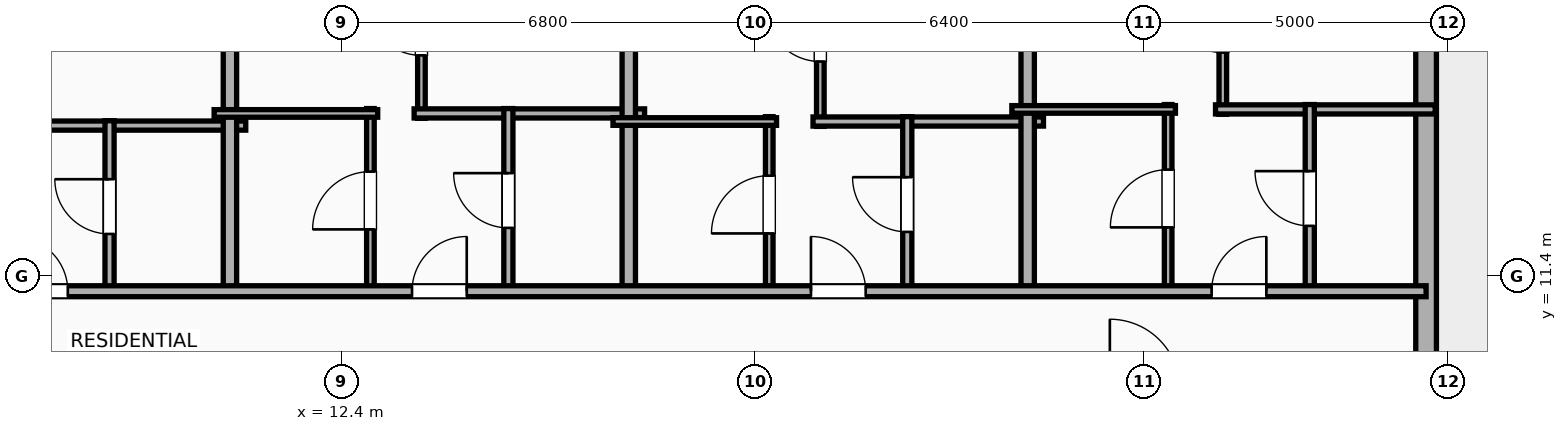
"""IFC4 building model, lengths in metres.
Left out: names, types, materials, properties, quantities, classifications, styles, units other than length and angle.
Written with IfcOpenShell. Run it as: python <this file> out.ifc"""

import sys

from ifc_helpers import new_model, si_unit, direction, frame, frame_2d, origin, place, context, subcontext, project, spatial, rectangle, extrude, element, fill, save


model = new_model("IFC4")
c1 = context("Model", 3, precision=1e-05, world=origin(), true_north=direction((0.0, 1.0)))
c2 = subcontext(c1, "Body", "Model", "MODEL_VIEW")
j1 = project(units=[si_unit("LENGTHUNIT", "METRE"), si_unit("PLANEANGLEUNIT", "RADIAN")], contexts=[c1])
p1 = place(None, origin())
s1 = spatial("IfcSite", under=j1, at=p1, CompositionType="ELEMENT")
p2 = place(p1, origin())
s2 = spatial("IfcBuilding", under=s1, at=p2, CompositionType="ELEMENT")
p3 = place(p2, frame((0.0, 0.0, 231.4)))
s3 = spatial("IfcBuildingStorey", under=s2, at=p3, CompositionType="ELEMENT", Elevation=231.4)
p4 = place(p3, frame((30.23, 16.583, 0.0), z_axis=(0.0, 0.0, 1.0), x_axis=(0.0, -1.0, 0.0)))
e1 = element("IfcWall", 1, at=p4, inside=s3, PredefinedType="ELEMENTEDWALL", context=c2, shape_type="SweptSolid", body=[
    extrude(rectangle(XDim=31.967, YDim=0.34, at=frame_2d((15.983, 0.0))), origin(), (0.0, 0.0, 1.0), 3.65),
])
p5 = place(p4, frame((23.925, 0.0, 0.75)))
e2 = element("IfcOpeningElement", 2, at=p5, cuts=e1, PredefinedType="OPENING", context=c2, shape_type="SweptSolid", body=[
    extrude(rectangle(XDim=1.8, YDim=2.1, at=frame_2d((0.9, 1.05))), frame((0.0, 0.18, 0.0), z_axis=(0.0, -1.0, 0.0), x_axis=(1.0, 0.0, 0.0)), (0.0, 0.0, 1.0), 0.36),
])
p6 = place(p4, frame((30.402, 0.0, 0.75)))
e3 = element("IfcOpeningElement", 3, at=p6, cuts=e1, PredefinedType="OPENING", context=c2, shape_type="SweptSolid", body=[
    extrude(rectangle(XDim=1.2, YDim=2.05, at=frame_2d((0.6, 1.025))), frame((0.0, 0.18, 0.0), z_axis=(0.0, -1.0, 0.0), x_axis=(1.0, 0.0, 0.0)), (0.0, 0.0, 1.0), 0.36),
])
p7 = place(p4, frame((11.113, 0.0, 0.75)))
e4 = element("IfcOpeningElement", 4, at=p7, cuts=e1, PredefinedType="OPENING", context=c2, shape_type="SweptSolid", body=[
    extrude(rectangle(XDim=1.2, YDim=2.05, at=frame_2d((0.6, 1.025))), frame((0.0, 0.18, 0.0), z_axis=(0.0, -1.0, 0.0), x_axis=(1.0, 0.0, 0.0)), (0.0, 0.0, 1.0), 0.36),
])
p8 = place(p3, frame((7.029, 13.874, 0.0), z_axis=(0.0, 0.0, 1.0), x_axis=(1.0, 0.0, 0.0)))
e5 = element("IfcWall", 5, at=p8, inside=s3, PredefinedType="PLUMBINGWALL", context=c2, shape_type="SweptSolid", body=[
    extrude(rectangle(XDim=3.79, YDim=0.15, at=frame_2d((1.895, 0.0))), origin(), (0.0, 0.0, 1.0), 3.65),
])
p9 = place(p3, frame((8.579, 11.13, 0.0), z_axis=(0.0, 0.0, 1.0), x_axis=(0.0, 1.0, 0.0)))
e6 = element("IfcWall", 6, at=p9, inside=s3, PredefinedType="PLUMBINGWALL", context=c2, shape_type="SweptSolid", body=[
    extrude(rectangle(XDim=2.824, YDim=0.15, at=frame_2d((1.412, 0.0))), origin(), (0.0, 0.0, 1.0), 3.65),
])
p10 = place(p9, frame((0.962, 0.0, 0.0)))
e7 = element("IfcOpeningElement", 7, at=p10, cuts=e6, PredefinedType="OPENING", context=c2, shape_type="SweptSolid", body=[
    extrude(rectangle(XDim=0.9, YDim=2.05, at=frame_2d((0.45, 1.025))), frame((0.0, 0.085, 0.0), z_axis=(0.0, -1.0, 0.0), x_axis=(1.0, 0.0, 0.0)), (0.0, 0.0, 1.0), 0.17),
])
p11 = place(p3, frame((10.559, 11.07, 0.0), z_axis=(0.0, 0.0, 1.0), x_axis=(0.0, 1.0, 0.0)))
e8 = element("IfcWall", 8, at=p11, inside=s3, PredefinedType="PARTITIONING", context=c2, shape_type="SweptSolid", body=[
    extrude(rectangle(XDim=8.96, YDim=0.22, at=frame_2d((4.48, 0.0))), origin(), (0.0, 0.0, 1.0), 3.65),
])
p12 = place(p3, frame((13.708, 13.994, 0.0), z_axis=(0.0, 0.0, 1.0), x_axis=(0.0, 1.0, 0.0)))
e9 = element("IfcWall", 9, at=p12, inside=s3, PredefinedType="PARTITIONING", context=c2, shape_type="SweptSolid", body=[
    extrude(rectangle(XDim=6.186, YDim=0.125, at=frame_2d((3.093, 0.0))), origin(), (0.0, 0.0, 1.0), 3.65),
])
p13 = place(p12, frame((1.035, 0.0, 0.0)))
e10 = element("IfcOpeningElement", 10, at=p13, cuts=e9, PredefinedType="OPENING", context=c2, shape_type="SweptSolid", body=[
    extrude(rectangle(XDim=0.9, YDim=2.05, at=frame_2d((0.45, 1.025))), frame((0.0, 0.073, 0.0), z_axis=(0.0, -1.0, 0.0), x_axis=(1.0, 0.0, 0.0)), (0.0, 0.0, 1.0), 0.145),
])
p14 = place(p3, frame((13.588, 14.074, 0.0), z_axis=(0.0, 0.0, 1.0), x_axis=(1.0, 0.0, 0.0)))
e11 = element("IfcWall", 11, at=p14, inside=s3, PredefinedType="PLUMBINGWALL", context=c2, shape_type="SweptSolid", body=[
    extrude(rectangle(XDim=3.79, YDim=0.15, at=frame_2d((1.895, 0.0))), origin(), (0.0, 0.0, 1.0), 3.65),
])
p15 = place(p3, frame((12.869, 11.13, 0.0), z_axis=(0.0, 0.0, 1.0), x_axis=(0.0, 1.0, 0.0)))
e12 = element("IfcWall", 12, at=p15, inside=s3, PredefinedType="PARTITIONING", context=c2, shape_type="SweptSolid", body=[
    extrude(rectangle(XDim=3.024, YDim=0.125, at=frame_2d((1.512, 0.0))), origin(), (0.0, 0.0, 1.0), 3.65),
])
p16 = place(p15, frame((1.037, 0.0, 0.0)))
e13 = element("IfcOpeningElement", 13, at=p16, cuts=e12, PredefinedType="OPENING", context=c2, shape_type="SweptSolid", body=[
    extrude(rectangle(XDim=0.95, YDim=2.05, at=frame_2d((0.475, 1.025))), frame((0.0, 0.073, 0.0), z_axis=(0.0, -1.0, 0.0), x_axis=(1.0, 0.0, 0.0)), (0.0, 0.0, 1.0), 0.145),
])
p17 = place(p3, frame((10.299, 14.074, 0.0), z_axis=(0.0, 0.0, 1.0), x_axis=(1.0, 0.0, 0.0)))
e14 = element("IfcWall", 14, at=p17, inside=s3, PredefinedType="PARTITIONING", context=c2, shape_type="SweptSolid", body=[
    extrude(rectangle(XDim=2.69, YDim=0.125, at=frame_2d((1.345, 0.0))), origin(), (0.0, 0.0, 1.0), 3.65),
])
p18 = place(p3, frame((15.138, 11.13, 0.0), z_axis=(0.0, 0.0, 1.0), x_axis=(0.0, 1.0, 0.0)))
e15 = element("IfcWall", 15, at=p18, inside=s3, PredefinedType="PLUMBINGWALL", context=c2, shape_type="SweptSolid", body=[
    extrude(rectangle(XDim=3.024, YDim=0.15, at=frame_2d((1.512, 0.0))), origin(), (0.0, 0.0, 1.0), 3.65),
])
p19 = place(p18, frame((1.062, 0.0, 0.0)))
e16 = element("IfcOpeningElement", 16, at=p19, cuts=e15, PredefinedType="OPENING", context=c2, shape_type="SweptSolid", body=[
    extrude(rectangle(XDim=0.9, YDim=2.05, at=frame_2d((0.45, 1.025))), frame((0.0, 0.085, 0.0), z_axis=(0.0, -1.0, 0.0), x_axis=(1.0, 0.0, 0.0)), (0.0, 0.0, 1.0), 0.17),
])
p20 = place(p3, frame((17.118, 11.07, 0.0), z_axis=(0.0, 0.0, 1.0), x_axis=(0.0, 1.0, 0.0)))
e17 = element("IfcWall", 17, at=p20, inside=s3, PredefinedType="PARTITIONING", context=c2, shape_type="SweptSolid", body=[
    extrude(rectangle(XDim=8.96, YDim=0.22, at=frame_2d((4.48, 0.0))), origin(), (0.0, 0.0, 1.0), 3.65),
])
p21 = place(p3, frame((20.268, 13.861, 0.0), z_axis=(0.0, 0.0, 1.0), x_axis=(0.0, 1.0, 0.0)))
e18 = element("IfcWall", 18, at=p21, inside=s3, PredefinedType="PARTITIONING", context=c2, shape_type="SweptSolid", body=[
    extrude(rectangle(XDim=6.319, YDim=0.125, at=frame_2d((3.159, 0.0))), origin(), (0.0, 0.0, 1.0), 3.65),
])
p22 = place(p21, frame((1.067, 0.0, 0.0)))
e19 = element("IfcOpeningElement", 19, at=p22, cuts=e18, PredefinedType="OPENING", context=c2, shape_type="SweptSolid", body=[
    extrude(rectangle(XDim=0.9, YDim=2.05, at=frame_2d((0.45, 1.025))), frame((0.0, 0.073, 0.0), z_axis=(0.0, -1.0, 0.0), x_axis=(1.0, 0.0, 0.0)), (0.0, 0.0, 1.0), 0.145),
])
p23 = place(p3, frame((20.148, 13.941, 0.0), z_axis=(0.0, 0.0, 1.0), x_axis=(1.0, 0.0, 0.0)))
e20 = element("IfcWall", 20, at=p23, inside=s3, PredefinedType="PLUMBINGWALL", context=c2, shape_type="SweptSolid", body=[
    extrude(rectangle(XDim=3.79, YDim=0.15, at=frame_2d((1.895, 0.0))), origin(), (0.0, 0.0, 1.0), 3.65),
])
p24 = place(p3, frame((19.428, 11.13, 0.0), z_axis=(0.0, 0.0, 1.0), x_axis=(0.0, 1.0, 0.0)))
e21 = element("IfcWall", 21, at=p24, inside=s3, PredefinedType="PARTITIONING", context=c2, shape_type="SweptSolid", body=[
    extrude(rectangle(XDim=2.891, YDim=0.125, at=frame_2d((1.446, 0.0))), origin(), (0.0, 0.0, 1.0), 3.65),
])
p25 = place(p24, frame((0.97, 0.0, 0.0)))
e22 = element("IfcOpeningElement", 22, at=p25, cuts=e21, PredefinedType="OPENING", context=c2, shape_type="SweptSolid", body=[
    extrude(rectangle(XDim=0.95, YDim=2.05, at=frame_2d((0.475, 1.025))), frame((0.0, 0.073, 0.0), z_axis=(0.0, -1.0, 0.0), x_axis=(1.0, 0.0, 0.0)), (0.0, 0.0, 1.0), 0.145),
])
p26 = place(p3, frame((16.858, 13.941, 0.0), z_axis=(0.0, 0.0, 1.0), x_axis=(1.0, 0.0, 0.0)))
e23 = element("IfcWall", 23, at=p26, inside=s3, PredefinedType="PARTITIONING", context=c2, shape_type="SweptSolid", body=[
    extrude(rectangle(XDim=2.69, YDim=0.125, at=frame_2d((1.345, 0.0))), origin(), (0.0, 0.0, 1.0), 3.65),
])
p27 = place(p3, frame((21.698, 11.13, 0.0), z_axis=(0.0, 0.0, 1.0), x_axis=(0.0, 1.0, 0.0)))
e24 = element("IfcWall", 24, at=p27, inside=s3, PredefinedType="PLUMBINGWALL", context=c2, shape_type="SweptSolid", body=[
    extrude(rectangle(XDim=2.891, YDim=0.15, at=frame_2d((1.446, 0.0))), origin(), (0.0, 0.0, 1.0), 3.65),
])
p28 = place(p27, frame((0.996, 0.0, 0.0)))
e25 = element("IfcOpeningElement", 25, at=p28, cuts=e24, PredefinedType="OPENING", context=c2, shape_type="SweptSolid", body=[
    extrude(rectangle(XDim=0.9, YDim=2.05, at=frame_2d((0.45, 1.025))), frame((0.0, 0.085, 0.0), z_axis=(0.0, -1.0, 0.0), x_axis=(1.0, 0.0, 0.0)), (0.0, 0.0, 1.0), 0.17),
])
p29 = place(p3, frame((23.678, 11.07, 0.0), z_axis=(0.0, 0.0, 1.0), x_axis=(0.0, 1.0, 0.0)))
e26 = element("IfcWall", 26, at=p29, inside=s3, PredefinedType="PARTITIONING", context=c2, shape_type="SweptSolid", body=[
    extrude(rectangle(XDim=8.96, YDim=0.22, at=frame_2d((4.48, 0.0))), origin(), (0.0, 0.0, 1.0), 3.65),
])
p30 = place(p3, frame((26.887, 14.06, 0.0), z_axis=(0.0, 0.0, 1.0), x_axis=(0.0, 1.0, 0.0)))
e27 = element("IfcWall", 27, at=p30, inside=s3, PredefinedType="PARTITIONING", context=c2, shape_type="SweptSolid", body=[
    extrude(rectangle(XDim=6.102, YDim=0.125, at=frame_2d((3.051, 0.0))), origin(), (0.0, 0.0, 1.0), 3.65),
])
p31 = place(p30, frame((1.015, 0.0, 0.0)))
e28 = element("IfcOpeningElement", 28, at=p31, cuts=e27, PredefinedType="OPENING", context=c2, shape_type="SweptSolid", body=[
    extrude(rectangle(XDim=0.9, YDim=2.05, at=frame_2d((0.45, 1.025))), frame((0.0, 0.073, 0.0), z_axis=(0.0, -1.0, 0.0), x_axis=(1.0, 0.0, 0.0)), (0.0, 0.0, 1.0), 0.145),
])
p32 = place(p3, frame((26.767, 14.14, 0.0), z_axis=(0.0, 0.0, 1.0), x_axis=(1.0, 0.0, 0.0)))
e29 = element("IfcWall", 29, at=p32, inside=s3, PredefinedType="PLUMBINGWALL", context=c2, shape_type="SweptSolid", body=[
    extrude(rectangle(XDim=3.613, YDim=0.15, at=frame_2d((1.806, 0.0))), origin(), (0.0, 0.0, 1.0), 3.65),
])
p33 = place(p3, frame((25.988, 11.13, 0.0), z_axis=(0.0, 0.0, 1.0), x_axis=(0.0, 1.0, 0.0)))
e30 = element("IfcWall", 30, at=p33, inside=s3, PredefinedType="PARTITIONING", context=c2, shape_type="SweptSolid", body=[
    extrude(rectangle(XDim=3.09, YDim=0.125, at=frame_2d((1.545, 0.0))), origin(), (0.0, 0.0, 1.0), 3.65),
])
p34 = place(p33, frame((1.07, 0.0, 0.0)))
e31 = element("IfcOpeningElement", 31, at=p34, cuts=e30, PredefinedType="OPENING", context=c2, shape_type="SweptSolid", body=[
    extrude(rectangle(XDim=0.95, YDim=2.05, at=frame_2d((0.475, 1.025))), frame((0.0, 0.073, 0.0), z_axis=(0.0, -1.0, 0.0), x_axis=(1.0, 0.0, 0.0)), (0.0, 0.0, 1.0), 0.145),
])
p35 = place(p3, frame((23.418, 14.14, 0.0), z_axis=(0.0, 0.0, 1.0), x_axis=(1.0, 0.0, 0.0)))
e32 = element("IfcWall", 32, at=p35, inside=s3, PredefinedType="PARTITIONING", context=c2, shape_type="SweptSolid", body=[
    extrude(rectangle(XDim=2.69, YDim=0.125, at=frame_2d((1.345, 0.0))), origin(), (0.0, 0.0, 1.0), 3.65),
])
p36 = place(p3, frame((28.317, 11.13, 0.0), z_axis=(0.0, 0.0, 1.0), x_axis=(0.0, 1.0, 0.0)))
e33 = element("IfcWall", 33, at=p36, inside=s3, PredefinedType="PLUMBINGWALL", context=c2, shape_type="SweptSolid", body=[
    extrude(rectangle(XDim=3.09, YDim=0.15, at=frame_2d((1.545, 0.0))), origin(), (0.0, 0.0, 1.0), 3.65),
])
p37 = place(p36, frame((1.095, 0.0, 0.0)))
e34 = element("IfcOpeningElement", 34, at=p37, cuts=e33, PredefinedType="OPENING", context=c2, shape_type="SweptSolid", body=[
    extrude(rectangle(XDim=0.9, YDim=2.05, at=frame_2d((0.45, 1.025))), frame((0.0, 0.085, 0.0), z_axis=(0.0, -1.0, 0.0), x_axis=(1.0, 0.0, 0.0)), (0.0, 0.0, 1.0), 0.17),
])
p38 = place(p3, frame((-26.23, 11.15, 0.0), z_axis=(0.0, 0.0, 1.0), x_axis=(1.0, 0.0, 0.0)))
e35 = element("IfcWall", 35, at=p38, inside=s3, PredefinedType="PARTITIONING", context=c2, shape_type="SweptSolid", body=[
    extrude(rectangle(XDim=56.46, YDim=0.18, at=frame_2d((28.23, 0.0))), origin(), (0.0, 0.0, 1.0), 3.65),
])
p39 = place(p38, frame((3.614, 0.0, 0.0)))
e36 = element("IfcOpeningElement", 36, at=p39, cuts=e35, PredefinedType="OPENING", context=c2, shape_type="SweptSolid", body=[
    extrude(rectangle(XDim=1.15, YDim=2.05, at=frame_2d((0.575, 1.025))), frame((0.0, 0.1, 0.0), z_axis=(0.0, -1.0, 0.0), x_axis=(1.0, 0.0, 0.0)), (0.0, 0.0, 1.0), 0.2),
])
p40 = place(p38, frame((11.761, 0.0, 0.0)))
e37 = element("IfcOpeningElement", 37, at=p40, cuts=e35, PredefinedType="OPENING", context=c2, shape_type="SweptSolid", body=[
    extrude(rectangle(XDim=1.15, YDim=2.05, at=frame_2d((0.575, 1.025))), frame((0.0, 0.1, 0.0), z_axis=(0.0, -1.0, 0.0), x_axis=(1.0, 0.0, 0.0)), (0.0, 0.0, 1.0), 0.2),
])
p41 = place(p38, frame((19.447, 0.0, 0.0)))
e38 = element("IfcOpeningElement", 38, at=p41, cuts=e35, PredefinedType="OPENING", context=c2, shape_type="SweptSolid", body=[
    extrude(rectangle(XDim=0.9, YDim=2.05, at=frame_2d((0.45, 1.025))), frame((0.0, 0.1, 0.0), z_axis=(0.0, -1.0, 0.0), x_axis=(1.0, 0.0, 0.0)), (0.0, 0.0, 1.0), 0.2),
])
p42 = place(p38, frame((26.448, 0.0, 0.0)))
e39 = element("IfcOpeningElement", 39, at=p42, cuts=e35, PredefinedType="OPENING", context=c2, shape_type="SweptSolid", body=[
    extrude(rectangle(XDim=0.9, YDim=2.05, at=frame_2d((0.45, 1.025))), frame((0.0, 0.1, 0.0), z_axis=(0.0, -1.0, 0.0), x_axis=(1.0, 0.0, 0.0)), (0.0, 0.0, 1.0), 0.2),
])
p43 = place(p38, frame((33.223, 0.0, 0.0)))
e40 = element("IfcOpeningElement", 40, at=p43, cuts=e35, PredefinedType="OPENING", context=c2, shape_type="SweptSolid", body=[
    extrude(rectangle(XDim=0.9, YDim=2.05, at=frame_2d((0.45, 1.025))), frame((0.0, 0.1, 0.0), z_axis=(0.0, -1.0, 0.0), x_axis=(1.0, 0.0, 0.0)), (0.0, 0.0, 1.0), 0.2),
])
p44 = place(p38, frame((39.783, 0.0, 0.0)))
e41 = element("IfcOpeningElement", 41, at=p44, cuts=e35, PredefinedType="OPENING", context=c2, shape_type="SweptSolid", body=[
    extrude(rectangle(XDim=0.9, YDim=2.05, at=frame_2d((0.45, 1.025))), frame((0.0, 0.1, 0.0), z_axis=(0.0, -1.0, 0.0), x_axis=(1.0, 0.0, 0.0)), (0.0, 0.0, 1.0), 0.2),
])
p45 = place(p38, frame((46.344, 0.0, 0.0)))
e42 = element("IfcOpeningElement", 42, at=p45, cuts=e35, PredefinedType="OPENING", context=c2, shape_type="SweptSolid", body=[
    extrude(rectangle(XDim=0.9, YDim=2.05, at=frame_2d((0.45, 1.025))), frame((0.0, 0.1, 0.0), z_axis=(0.0, -1.0, 0.0), x_axis=(1.0, 0.0, 0.0)), (0.0, 0.0, 1.0), 0.2),
])
p46 = place(p38, frame((52.933, 0.0, 0.0)))
e43 = element("IfcOpeningElement", 43, at=p46, cuts=e35, PredefinedType="OPENING", context=c2, shape_type="SweptSolid", body=[
    extrude(rectangle(XDim=0.9, YDim=2.05, at=frame_2d((0.45, 1.025))), frame((0.0, 0.1, 0.0), z_axis=(0.0, -1.0, 0.0), x_axis=(1.0, 0.0, 0.0)), (0.0, 0.0, 1.0), 0.2),
])
p47 = place(p10, origin())
e44 = element("IfcDoor", 44, at=p47, inside=s3, OperationType="SINGLE_SWING_RIGHT", PredefinedType="DOOR", context=c2, shape_type="SweptSolid", body=[
    extrude(rectangle(XDim=0.9, YDim=2.05, at=frame_2d((0.45, 1.025))), frame((0.0, 0.025, 0.0), z_axis=(0.0, -1.0, 0.0), x_axis=(1.0, 0.0, 0.0)), (0.0, 0.0, 1.0), 0.05),
])
fill(e7, e44)
p48 = place(p13, origin())
e45 = element("IfcDoor", 45, at=p48, inside=s3, OperationType="SINGLE_SWING_RIGHT", PredefinedType="DOOR", context=c2, shape_type="SweptSolid", body=[
    extrude(rectangle(XDim=0.9, YDim=2.05, at=frame_2d((0.45, 1.025))), frame((0.0, 0.025, 0.0), z_axis=(0.0, -1.0, 0.0), x_axis=(1.0, 0.0, 0.0)), (0.0, 0.0, 1.0), 0.05),
])
fill(e10, e45)
p49 = place(p16, origin())
e46 = element("IfcDoor", 46, at=p49, inside=s3, OperationType="SINGLE_SWING_LEFT", PredefinedType="DOOR", context=c2, shape_type="SweptSolid", body=[
    extrude(rectangle(XDim=0.95, YDim=2.05, at=frame_2d((0.475, 1.025))), frame((0.0, 0.025, 0.0), z_axis=(0.0, -1.0, 0.0), x_axis=(1.0, 0.0, 0.0)), (0.0, 0.0, 1.0), 0.05),
])
fill(e13, e46)
p50 = place(p19, origin())
e47 = element("IfcDoor", 47, at=p50, inside=s3, OperationType="SINGLE_SWING_RIGHT", PredefinedType="DOOR", context=c2, shape_type="SweptSolid", body=[
    extrude(rectangle(XDim=0.9, YDim=2.05, at=frame_2d((0.45, 1.025))), frame((0.0, 0.025, 0.0), z_axis=(0.0, -1.0, 0.0), x_axis=(1.0, 0.0, 0.0)), (0.0, 0.0, 1.0), 0.05),
])
fill(e16, e47)
p51 = place(p22, origin())
e48 = element("IfcDoor", 48, at=p51, inside=s3, OperationType="SINGLE_SWING_RIGHT", PredefinedType="DOOR", context=c2, shape_type="SweptSolid", body=[
    extrude(rectangle(XDim=0.9, YDim=2.05, at=frame_2d((0.45, 1.025))), frame((0.0, 0.025, 0.0), z_axis=(0.0, -1.0, 0.0), x_axis=(1.0, 0.0, 0.0)), (0.0, 0.0, 1.0), 0.05),
])
fill(e19, e48)
p52 = place(p25, origin())
e49 = element("IfcDoor", 49, at=p52, inside=s3, OperationType="SINGLE_SWING_LEFT", PredefinedType="DOOR", context=c2, shape_type="SweptSolid", body=[
    extrude(rectangle(XDim=0.95, YDim=2.05, at=frame_2d((0.475, 1.025))), frame((0.0, 0.025, 0.0), z_axis=(0.0, -1.0, 0.0), x_axis=(1.0, 0.0, 0.0)), (0.0, 0.0, 1.0), 0.05),
])
fill(e22, e49)
p53 = place(p28, origin())
e50 = element("IfcDoor", 50, at=p53, inside=s3, OperationType="SINGLE_SWING_RIGHT", PredefinedType="DOOR", context=c2, shape_type="SweptSolid", body=[
    extrude(rectangle(XDim=0.9, YDim=2.05, at=frame_2d((0.45, 1.025))), frame((0.0, 0.025, 0.0), z_axis=(0.0, -1.0, 0.0), x_axis=(1.0, 0.0, 0.0)), (0.0, 0.0, 1.0), 0.05),
])
fill(e25, e50)
p54 = place(p31, origin())
e51 = element("IfcDoor", 51, at=p54, inside=s3, OperationType="SINGLE_SWING_RIGHT", PredefinedType="DOOR", context=c2, shape_type="SweptSolid", body=[
    extrude(rectangle(XDim=0.9, YDim=2.05, at=frame_2d((0.45, 1.025))), frame((0.0, 0.025, 0.0), z_axis=(0.0, -1.0, 0.0), x_axis=(1.0, 0.0, 0.0)), (0.0, 0.0, 1.0), 0.05),
])
fill(e28, e51)
p55 = place(p34, origin())
e52 = element("IfcDoor", 52, at=p55, inside=s3, OperationType="SINGLE_SWING_LEFT", PredefinedType="DOOR", context=c2, shape_type="SweptSolid", body=[
    extrude(rectangle(XDim=0.95, YDim=2.05, at=frame_2d((0.475, 1.025))), frame((0.0, 0.025, 0.0), z_axis=(0.0, -1.0, 0.0), x_axis=(1.0, 0.0, 0.0)), (0.0, 0.0, 1.0), 0.05),
])
fill(e31, e52)
p56 = place(p37, origin())
e53 = element("IfcDoor", 53, at=p56, inside=s3, OperationType="SINGLE_SWING_RIGHT", PredefinedType="DOOR", context=c2, shape_type="SweptSolid", body=[
    extrude(rectangle(XDim=0.9, YDim=2.05, at=frame_2d((0.45, 1.025))), frame((0.0, 0.025, 0.0), z_axis=(0.0, -1.0, 0.0), x_axis=(1.0, 0.0, 0.0)), (0.0, 0.0, 1.0), 0.05),
])
fill(e34, e53)
p57 = place(p43, origin())
e54 = element("IfcDoor", 54, at=p57, inside=s3, OperationType="SINGLE_SWING_LEFT", PredefinedType="DOOR", context=c2, shape_type="SweptSolid", body=[
    extrude(rectangle(XDim=0.9, YDim=2.05, at=frame_2d((0.45, 1.025))), frame((0.0, 0.025, 0.0), z_axis=(0.0, -1.0, 0.0), x_axis=(1.0, 0.0, 0.0)), (0.0, 0.0, 1.0), 0.05),
])
fill(e40, e54)
p58 = place(p44, origin())
e55 = element("IfcDoor", 55, at=p58, inside=s3, OperationType="SINGLE_SWING_RIGHT", PredefinedType="DOOR", context=c2, shape_type="SweptSolid", body=[
    extrude(rectangle(XDim=0.9, YDim=2.05, at=frame_2d((0.45, 1.025))), frame((0.0, 0.025, 0.0), z_axis=(0.0, -1.0, 0.0), x_axis=(1.0, 0.0, 0.0)), (0.0, 0.0, 1.0), 0.05),
])
fill(e41, e55)
p59 = place(p45, origin())
e56 = element("IfcDoor", 56, at=p59, inside=s3, OperationType="SINGLE_SWING_LEFT", PredefinedType="DOOR", context=c2, shape_type="SweptSolid", body=[
    extrude(rectangle(XDim=0.9, YDim=2.05, at=frame_2d((0.45, 1.025))), frame((0.0, 0.025, 0.0), z_axis=(0.0, -1.0, 0.0), x_axis=(1.0, 0.0, 0.0)), (0.0, 0.0, 1.0), 0.05),
])
fill(e42, e56)
p60 = place(p46, origin())
e57 = element("IfcDoor", 57, at=p60, inside=s3, OperationType="SINGLE_SWING_RIGHT", PredefinedType="DOOR", context=c2, shape_type="SweptSolid", body=[
    extrude(rectangle(XDim=0.9, YDim=2.05, at=frame_2d((0.45, 1.025))), frame((0.0, 0.025, 0.0), z_axis=(0.0, -1.0, 0.0), x_axis=(1.0, 0.0, 0.0)), (0.0, 0.0, 1.0), 0.05),
])
fill(e43, e57)
save(model, sys.argv[1])
